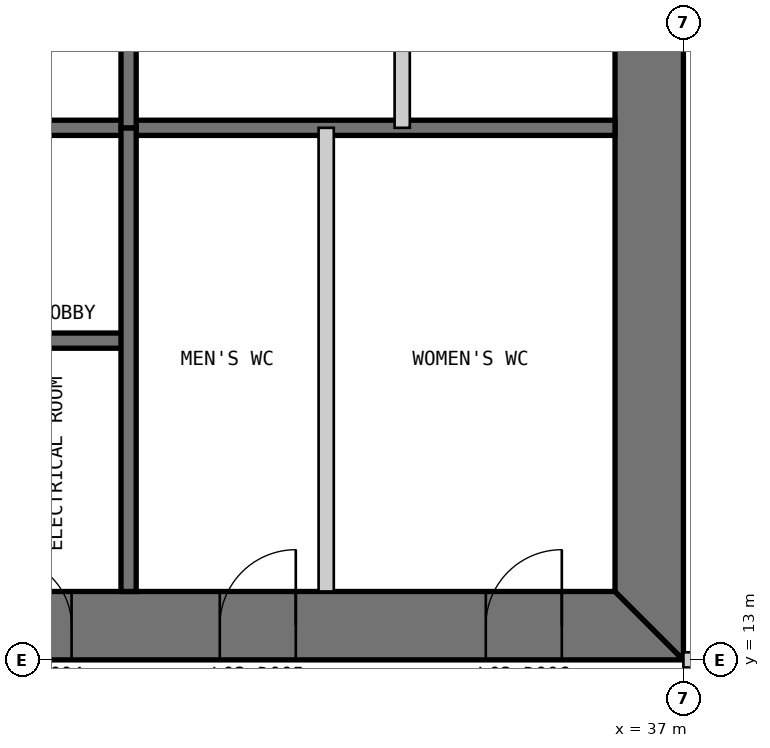
"""IFC4 building model, lengths in metres.
Left out: names, types, materials, properties, quantities, classifications, styles, units other than length and angle.
Written with IfcOpenShell. Run it as: python <this file> out.ifc"""

import sys

from ifc_helpers import new_model, si_unit, direction, frame, frame_2d, origin, place, context, subcontext, project, spatial, polyline, rectangle, outline, extrude, element, fill, save


model = new_model("IFC4")
c1 = context("Model", 3, precision=1e-05, world=origin(), true_north=direction((0.0, 1.0)))
c2 = subcontext(c1, "Body", "Model", "MODEL_VIEW")
j1 = project(units=[si_unit("LENGTHUNIT", "METRE"), si_unit("PLANEANGLEUNIT", "RADIAN")], contexts=[c1])
p1 = place(None, origin())
s1 = spatial("IfcSite", under=j1, at=p1, CompositionType="ELEMENT")
p2 = place(p1, origin())
s2 = spatial("IfcBuilding", under=s1, at=p2, CompositionType="ELEMENT")
p3 = place(p2, frame((0.0, 0.0, 16.6)))
s3 = spatial("IfcBuildingStorey", under=s2, at=p3, CompositionType="ELEMENT", Elevation=16.6)
p4 = place(p3, frame((13.0, 13.45, 0.0), z_axis=(0.0, 0.0, 1.0), x_axis=(1.0, 0.0, 0.0)))
e1 = element("IfcWall", 1, at=p4, inside=s3, PredefinedType="SHEAR", context=c2, shape_type="SweptSolid", body=[
    extrude(outline(polyline([(0.0, -0.45), (24.0, -0.45), (23.1, 0.45), (0.9, 0.45), (0.0, -0.45)])), origin(), (0.0, 0.0, 1.0), 4.8),
])
p5 = place(p4, frame((4.9, 0.0, 0.0)))
e2 = element("IfcOpeningElement", 2, at=p5, cuts=e1, PredefinedType="OPENING", context=c2, shape_type="SweptSolid", body=[
    extrude(rectangle(XDim=1.0, YDim=2.2, at=frame_2d((0.5, 1.1))), frame((0.0, 0.46, 0.0), z_axis=(0.0, -1.0, 0.0), x_axis=(1.0, 0.0, 0.0)), (0.0, 0.0, 1.0), 0.92),
])
p6 = place(p4, frame((8.9, 0.0, 0.0)))
e3 = element("IfcOpeningElement", 3, at=p6, cuts=e1, PredefinedType="OPENING", context=c2, shape_type="SweptSolid", body=[
    extrude(rectangle(XDim=1.1, YDim=2.2, at=frame_2d((0.55, 1.1))), frame((0.0, 0.46, 0.0), z_axis=(0.0, -1.0, 0.0), x_axis=(1.0, 0.0, 0.0)), (0.0, 0.0, 1.0), 0.92),
])
p7 = place(p4, frame((15.05, 0.0, 0.0)))
e4 = element("IfcOpeningElement", 4, at=p7, cuts=e1, PredefinedType="OPENING", context=c2, shape_type="SweptSolid", body=[
    extrude(rectangle(XDim=0.9, YDim=2.2, at=frame_2d((0.45, 1.1))), frame((0.0, 0.46, 0.0), z_axis=(0.0, -1.0, 0.0), x_axis=(1.0, 0.0, 0.0)), (0.0, 0.0, 1.0), 0.92),
])
p8 = place(p4, frame((17.9, 0.0, 0.0)))
e5 = element("IfcOpeningElement", 5, at=p8, cuts=e1, PredefinedType="OPENING", context=c2, shape_type="SweptSolid", body=[
    extrude(rectangle(XDim=1.0, YDim=2.2, at=frame_2d((0.5, 1.1))), frame((0.0, 0.46, 0.0), z_axis=(0.0, -1.0, 0.0), x_axis=(1.0, 0.0, 0.0)), (0.0, 0.0, 1.0), 0.92),
])
p9 = place(p4, frame((21.4, 0.0, 0.0)))
e6 = element("IfcOpeningElement", 6, at=p9, cuts=e1, PredefinedType="OPENING", context=c2, shape_type="SweptSolid", body=[
    extrude(rectangle(XDim=1.0, YDim=2.2, at=frame_2d((0.5, 1.1))), frame((0.0, 0.46, 0.0), z_axis=(0.0, -1.0, 0.0), x_axis=(1.0, 0.0, 0.0)), (0.0, 0.0, 1.0), 0.92),
])
p10 = place(p3, frame((36.55, 13.9, 0.0), z_axis=(0.0, 0.0, 1.0), x_axis=(0.0, 1.0, 0.0)))
e7 = element("IfcWall", 7, at=p10, inside=s3, PredefinedType="SHEAR", context=c2, shape_type="SweptSolid", body=[
    extrude(outline(polyline([(-0.9, -0.45), (23.1, -0.45), (22.2, 0.45), (0.0, 0.45), (-0.9, -0.45)])), origin(), (0.0, 0.0, 1.0), 4.8),
])
p11 = place(p10, frame((20.2, 0.0, 0.0)))
e8 = element("IfcOpeningElement", 8, at=p11, cuts=e7, PredefinedType="OPENING", context=c2, shape_type="SweptSolid", body=[
    extrude(rectangle(XDim=1.0, YDim=2.2, at=frame_2d((0.5, 1.1))), frame((0.0, 0.46, 0.0), z_axis=(0.0, -1.0, 0.0), x_axis=(1.0, 0.0, 0.0)), (0.0, 0.0, 1.0), 0.92),
])
p12 = place(p10, frame((17.25, 0.0, 0.0)))
e9 = element("IfcOpeningElement", 9, at=p12, cuts=e7, PredefinedType="OPENING", context=c2, shape_type="SweptSolid", body=[
    extrude(rectangle(XDim=0.9, YDim=2.2, at=frame_2d((0.45, 1.1))), frame((0.0, 0.46, 0.0), z_axis=(0.0, -1.0, 0.0), x_axis=(1.0, 0.0, 0.0)), (0.0, 0.0, 1.0), 0.92),
])
p13 = place(p3, frame((20.3, 17.2, 0.0), z_axis=(0.0, 0.0, 1.0), x_axis=(1.0, 0.0, 0.0)))
e10 = element("IfcWall", 10, at=p13, inside=s3, PredefinedType="SOLIDWALL", context=c2, shape_type="SweptSolid", body=[
    extrude(rectangle(XDim=9.4, YDim=0.2, at=frame_2d((4.7, 0.0))), origin(), (0.0, 0.0, 1.0), 4.6),
])
p14 = place(p13, frame((0.25, 0.0, 0.0)))
e11 = element("IfcOpeningElement", 11, at=p14, cuts=e10, PredefinedType="OPENING", context=c2, shape_type="SweptSolid", body=[
    extrude(rectangle(XDim=1.0, YDim=2.2, at=frame_2d((0.5, 1.1))), frame((0.0, 0.11, 0.0), z_axis=(0.0, -1.0, 0.0), x_axis=(1.0, 0.0, 0.0)), (0.0, 0.0, 1.0), 0.22),
])
p15 = place(p3, frame((20.3, 20.0, 0.0), z_axis=(0.0, 0.0, 1.0), x_axis=(1.0, 0.0, 0.0)))
e12 = element("IfcWall", 12, at=p15, inside=s3, PredefinedType="SOLIDWALL", context=c2, shape_type="SweptSolid", body=[
    extrude(rectangle(XDim=15.8, YDim=0.2, at=frame_2d((7.9, 0.0))), origin(), (0.0, 0.0, 1.0), 4.6),
])
p16 = place(p3, frame((29.7, 13.9, 0.0), z_axis=(0.0, 0.0, 1.0), x_axis=(0.0, 1.0, 0.0)))
e13 = element("IfcWall", 13, at=p16, inside=s3, PredefinedType="SOLIDWALL", context=c2, shape_type="SweptSolid", body=[
    extrude(rectangle(XDim=6.1, YDim=0.2, at=frame_2d((3.05, 0.0))), origin(), (0.0, 0.0, 1.0), 4.6),
])
p17 = place(p3, frame((32.3, 13.9, 0.0), z_axis=(0.0, 0.0, 1.0), x_axis=(0.0, 1.0, 0.0)))
e14 = element("IfcWall", 14, at=p17, inside=s3, PredefinedType="PARTITIONING", context=c2, shape_type="SweptSolid", body=[
    extrude(rectangle(XDim=6.1, YDim=0.2, at=frame_2d((3.05, 0.0))), origin(), (0.0, 0.0, 1.0), 4.6),
])
p18 = place(p3, frame((33.3, 36.1, 0.0), z_axis=(0.0, 0.0, 1.0), x_axis=(0.0, -1.0, 0.0)))
e15 = element("IfcWall", 15, at=p18, inside=s3, PredefinedType="PARTITIONING", context=c2, shape_type="SweptSolid", body=[
    extrude(rectangle(XDim=16.1, YDim=0.2, at=frame_2d((8.05, 0.0))), origin(), (0.0, 0.0, 1.0), 4.6),
])
p19 = place(p3, frame((29.7, 36.1, 0.0), z_axis=(0.0, 0.0, 1.0), x_axis=(0.0, -1.0, 0.0)))
e16 = element("IfcWall", 16, at=p19, inside=s3, PredefinedType="SOLIDWALL", context=c2, shape_type="SweptSolid", body=[
    extrude(rectangle(XDim=16.1, YDim=0.2, at=frame_2d((8.05, 0.0))), origin(), (0.0, 0.0, 1.0), 4.6),
])
p20 = place(p3, frame((37.0, 13.0, 0.0), z_axis=(0.0, 0.0, 1.0), x_axis=(1.0, 0.0, 0.0)))
e17 = element("IfcWall", 17, at=p20, inside=s3, PredefinedType="PARTITIONING", context=c2, shape_type="SweptSolid", body=[
    extrude(rectangle(XDim=6.0, YDim=0.2, at=frame_2d((3.0, 0.0))), origin(), (0.0, 0.0, 1.0), 3.653),
])
p21 = place(p7, origin())
e18 = element("IfcDoor", 18, at=p21, inside=s3, OperationType="SINGLE_SWING_LEFT", PredefinedType="DOOR", context=c2, shape_type="SweptSolid", body=[
    extrude(rectangle(XDim=0.9, YDim=2.2, at=frame_2d((0.45, 1.1))), frame((0.0, 0.025, 0.0), z_axis=(0.0, -1.0, 0.0), x_axis=(1.0, 0.0, 0.0)), (0.0, 0.0, 1.0), 0.05),
    extrude(outline(polyline([(0.0, 0.0), (0.04, 0.0), (0.04, 2.16), (0.86, 2.16), (0.86, 0.0), (0.9, 0.0), (0.9, 2.2), (0.0, 2.2), (0.0, 0.0)])), frame((0.0, 0.3, 0.0), z_axis=(0.0, -1.0, 0.0), x_axis=(1.0, 0.0, 0.0)), (0.0, 0.0, 1.0), 0.6),
])
fill(e4, e18)
p22 = place(p8, origin())
e19 = element("IfcDoor", 19, at=p22, inside=s3, OperationType="SINGLE_SWING_RIGHT", PredefinedType="DOOR", context=c2, shape_type="SweptSolid", body=[
    extrude(rectangle(XDim=1.0, YDim=2.2, at=frame_2d((0.5, 1.1))), frame((0.0, 0.025, 0.0), z_axis=(0.0, -1.0, 0.0), x_axis=(1.0, 0.0, 0.0)), (0.0, 0.0, 1.0), 0.05),
    extrude(outline(polyline([(0.0, 0.0), (0.04, 0.0), (0.04, 2.16), (0.96, 2.16), (0.96, 0.0), (1.0, 0.0), (1.0, 2.2), (0.0, 2.2), (0.0, 0.0)])), frame((0.0, 0.3, 0.0), z_axis=(0.0, -1.0, 0.0), x_axis=(1.0, 0.0, 0.0)), (0.0, 0.0, 1.0), 0.6),
])
fill(e5, e19)
p23 = place(p9, origin())
e20 = element("IfcDoor", 20, at=p23, inside=s3, OperationType="SINGLE_SWING_RIGHT", PredefinedType="DOOR", context=c2, shape_type="SweptSolid", body=[
    extrude(rectangle(XDim=1.0, YDim=2.2, at=frame_2d((0.5, 1.1))), frame((0.0, 0.025, 0.0), z_axis=(0.0, -1.0, 0.0), x_axis=(1.0, 0.0, 0.0)), (0.0, 0.0, 1.0), 0.05),
    extrude(outline(polyline([(0.0, 0.0), (0.04, 0.0), (0.04, 2.16), (0.96, 2.16), (0.96, 0.0), (1.0, 0.0), (1.0, 2.2), (0.0, 2.2), (0.0, 0.0)])), frame((0.0, 0.3, 0.0), z_axis=(0.0, -1.0, 0.0), x_axis=(1.0, 0.0, 0.0)), (0.0, 0.0, 1.0), 0.6),
])
fill(e6, e20)
save(model, sys.argv[1])
